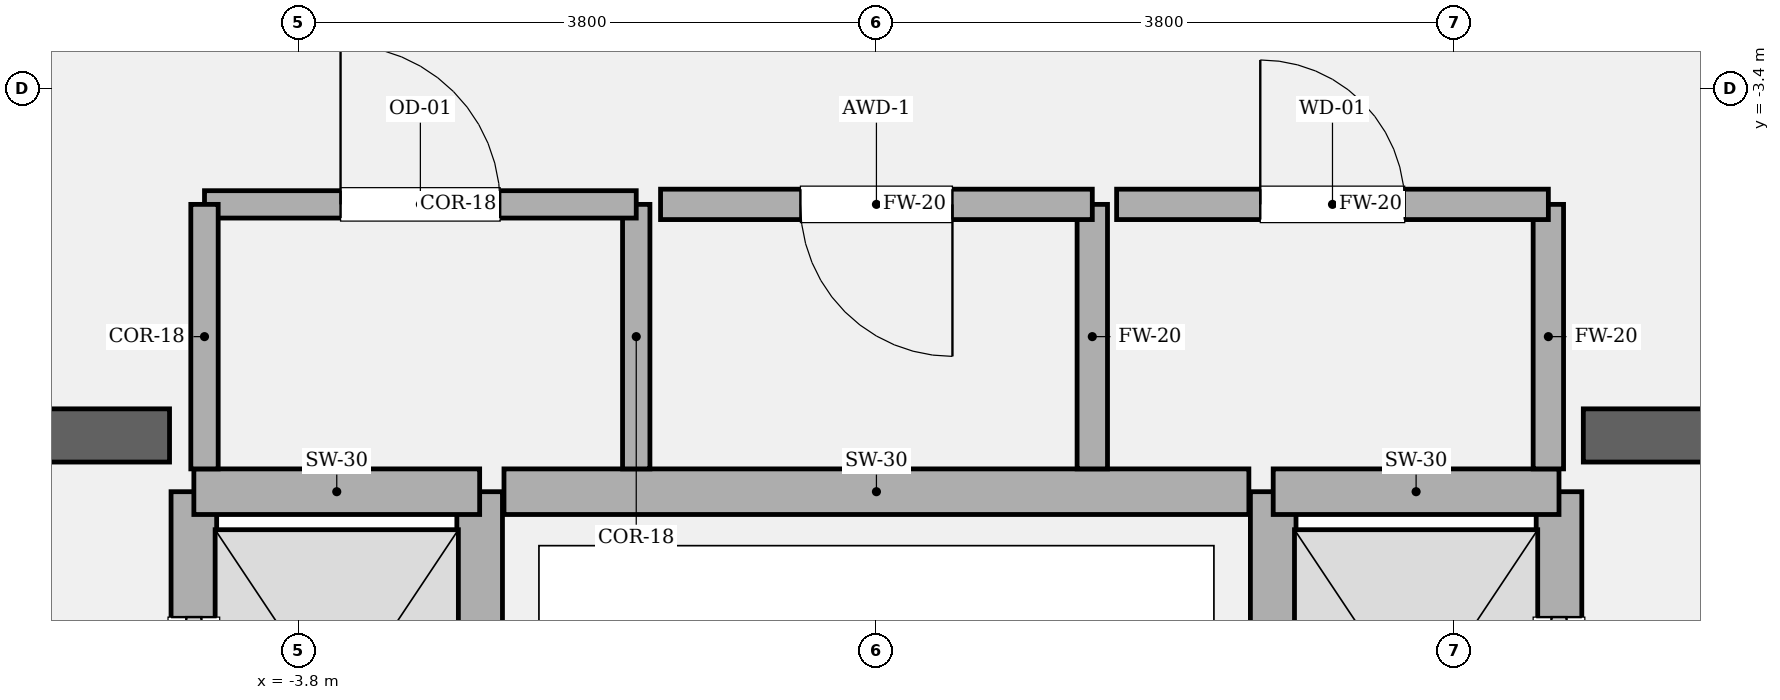
"""IFC4 building model, lengths in metres.
Left out: names, types, materials, properties, quantities, classifications, styles, units other than length and angle.
Written with IfcOpenShell. Run it as: python <this file> out.ifc"""

import sys

from ifc_helpers import new_model, si_unit, direction, frame, frame_2d, origin, place, context, subcontext, project, spatial, rectangle, extrude, element, fill, save


model = new_model("IFC4")
c1 = context("Model", 3, precision=1e-05, world=origin(), true_north=direction((0.0, 1.0)))
c2 = subcontext(c1, "Body", "Model", "MODEL_VIEW")
j1 = project(units=[si_unit("LENGTHUNIT", "METRE"), si_unit("PLANEANGLEUNIT", "RADIAN")], contexts=[c1])
p1 = place(None, origin())
s1 = spatial("IfcSite", under=j1, at=p1, CompositionType="ELEMENT")
p2 = place(p1, origin())
s2 = spatial("IfcBuilding", under=s1, at=p2, CompositionType="ELEMENT")
p3 = place(p2, frame((0.0, 0.0, 60.6)))
s3 = spatial("IfcBuildingStorey", under=s2, at=p3, CompositionType="ELEMENT", Elevation=60.6)
p4 = place(p3, frame((-9.825, -5.68, 0.0), z_axis=(0.0, 0.0, 1.0), x_axis=(1.0, 0.0, 0.0)))
e1 = element("IfcWall", 1, at=p4, inside=s3, PredefinedType="SOLIDWALL", context=c2, shape_type="SweptSolid", body=[
    extrude(rectangle(XDim=5.175, YDim=0.35, at=frame_2d((2.587, 0.0))), origin(), (0.0, 0.0, 1.0), 4.05),
])
p5 = place(p4, frame((1.285, 0.0, 0.0)))
e2 = element("IfcOpeningElement", 2, at=p5, cuts=e1, PredefinedType="OPENING", context=c2, shape_type="SweptSolid", body=[
    extrude(rectangle(XDim=1.18, YDim=2.2, at=frame_2d((0.59, 1.1))), frame((0.0, 0.185, 0.0), z_axis=(0.0, -1.0, 0.0), x_axis=(1.0, 0.0, 0.0)), (0.0, 0.0, 1.0), 0.37),
])
p6 = place(p3, frame((4.65, -5.68, 0.0), z_axis=(0.0, 0.0, 1.0), x_axis=(1.0, 0.0, 0.0)))
e3 = element("IfcWall", 3, at=p6, inside=s3, PredefinedType="SOLIDWALL", context=c2, shape_type="SweptSolid", body=[
    extrude(rectangle(XDim=5.175, YDim=0.35, at=frame_2d((2.587, 0.0))), origin(), (0.0, 0.0, 1.0), 4.05),
])
p7 = place(p6, frame((2.71, 0.0, 0.0)))
e4 = element("IfcOpeningElement", 4, at=p7, cuts=e3, PredefinedType="OPENING", context=c2, shape_type="SweptSolid", body=[
    extrude(rectangle(XDim=1.18, YDim=2.2, at=frame_2d((0.59, 1.1))), frame((0.0, 0.185, 0.0), z_axis=(0.0, -1.0, 0.0), x_axis=(1.0, 0.0, 0.0)), (0.0, 0.0, 1.0), 0.37),
])
p8 = place(p3, frame((-4.49, -8.82, 0.0), z_axis=(0.0, 0.0, 1.0), x_axis=(0.0, 1.0, 0.0)))
e5 = element("IfcWall", 5, at=p8, inside=s3, PredefinedType="SOLIDWALL", context=c2, shape_type="SweptSolid", body=[
    extrude(rectangle(XDim=2.77, YDim=0.3, at=frame_2d((1.385, 0.0))), origin(), (0.0, 0.0, 1.0), 3.81),
])
p9 = place(p8, frame((0.825, 0.0, 0.0)))
e6 = element("IfcOpeningElement", 6, at=p9, cuts=e5, PredefinedType="OPENING", context=c2, shape_type="SweptSolid", body=[
    extrude(rectangle(XDim=1.12, YDim=2.25, at=frame_2d((0.56, 1.125))), frame((0.0, 0.16, 0.0), z_axis=(0.0, -1.0, 0.0), x_axis=(1.0, 0.0, 0.0)), (0.0, 0.0, 1.0), 0.32),
])
p10 = place(p3, frame((-2.61, -8.82, 0.0), z_axis=(0.0, 0.0, 1.0), x_axis=(0.0, 1.0, 0.0)))
e7 = element("IfcWall", 7, at=p10, inside=s3, PredefinedType="SOLIDWALL", context=c2, shape_type="SweptSolid", body=[
    extrude(rectangle(XDim=2.77, YDim=0.3, at=frame_2d((1.385, 0.0))), origin(), (0.0, 0.0, 1.0), 3.81),
])
p11 = place(p3, frame((-4.49, -6.05, 0.0), z_axis=(0.0, 0.0, 1.0), x_axis=(1.0, 0.0, 0.0)))
e8 = element("IfcWall", 8, at=p11, inside=s3, PredefinedType="SOLIDWALL", context=c2, shape_type="SweptSolid", body=[
    extrude(rectangle(XDim=1.88, YDim=0.3, at=frame_2d((0.94, 0.0))), origin(), (0.0, 0.0, 1.0), 3.81),
])
p12 = place(p3, frame((4.49, -8.82, 0.0), z_axis=(0.0, 0.0, 1.0), x_axis=(0.0, 1.0, 0.0)))
e9 = element("IfcWall", 9, at=p12, inside=s3, PredefinedType="SOLIDWALL", context=c2, shape_type="SweptSolid", body=[
    extrude(rectangle(XDim=2.77, YDim=0.3, at=frame_2d((1.385, 0.0))), origin(), (0.0, 0.0, 1.0), 3.81),
])
p13 = place(p12, frame((0.825, 0.0, 0.0)))
e10 = element("IfcOpeningElement", 10, at=p13, cuts=e9, PredefinedType="OPENING", context=c2, shape_type="SweptSolid", body=[
    extrude(rectangle(XDim=1.12, YDim=2.25, at=frame_2d((0.56, 1.125))), frame((0.0, 0.16, 0.0), z_axis=(0.0, -1.0, 0.0), x_axis=(1.0, 0.0, 0.0)), (0.0, 0.0, 1.0), 0.32),
])
p14 = place(p3, frame((2.61, -8.82, 0.0), z_axis=(0.0, 0.0, 1.0), x_axis=(0.0, 1.0, 0.0)))
e11 = element("IfcWall", 11, at=p14, inside=s3, PredefinedType="SOLIDWALL", context=c2, shape_type="SweptSolid", body=[
    extrude(rectangle(XDim=2.77, YDim=0.3, at=frame_2d((1.385, 0.0))), origin(), (0.0, 0.0, 1.0), 3.81),
])
p15 = place(p3, frame((2.61, -6.05, 0.0), z_axis=(0.0, 0.0, 1.0), x_axis=(1.0, 0.0, 0.0)))
e12 = element("IfcWall", 12, at=p15, inside=s3, PredefinedType="SOLIDWALL", context=c2, shape_type="SweptSolid", body=[
    extrude(rectangle(XDim=1.88, YDim=0.3, at=frame_2d((0.94, 0.0))), origin(), (0.0, 0.0, 1.0), 3.81),
])
p16 = place(p3, frame((-2.45, -6.05, 0.0), z_axis=(0.0, 0.0, 1.0), x_axis=(1.0, 0.0, 0.0)))
e13 = element("IfcWall", 13, at=p16, inside=s3, PredefinedType="SOLIDWALL", context=c2, shape_type="SweptSolid", body=[
    extrude(rectangle(XDim=4.9, YDim=0.3, at=frame_2d((2.45, 0.0))), origin(), (0.0, 0.0, 1.0), 3.81),
])
p17 = place(p3, frame((-1.58, -5.9, 0.0), z_axis=(0.0, 0.0, 1.0), x_axis=(0.0, 1.0, 0.0)))
e14 = element("IfcWall", 14, at=p17, inside=s3, PredefinedType="PARTITIONING", context=c2, shape_type="SweptSolid", body=[
    extrude(rectangle(XDim=1.74, YDim=0.18, at=frame_2d((0.87, 0.0))), origin(), (0.0, 0.0, 1.0), 3.81),
])
p18 = place(p3, frame((-1.58, -4.16, 0.0), z_axis=(0.0, 0.0, 1.0), x_axis=(-1.0, 0.0, 0.0)))
e15 = element("IfcWall", 15, at=p18, inside=s3, PredefinedType="PARTITIONING", context=c2, shape_type="SweptSolid", body=[
    extrude(rectangle(XDim=2.84, YDim=0.18, at=frame_2d((1.42, 0.0))), origin(), (0.0, 0.0, 1.0), 3.81),
])
p19 = place(p18, frame((0.895, 0.0, 0.0)))
e16 = element("IfcOpeningElement", 16, at=p19, cuts=e15, PredefinedType="OPENING", context=c2, shape_type="SweptSolid", body=[
    extrude(rectangle(XDim=1.05, YDim=2.2, at=frame_2d((0.525, 1.1))), frame((0.0, 0.1, 0.0), z_axis=(0.0, -1.0, 0.0), x_axis=(1.0, 0.0, 0.0)), (0.0, 0.0, 1.0), 0.2),
])
p20 = place(p3, frame((-4.42, -4.16, 0.0), z_axis=(0.0, 0.0, 1.0), x_axis=(0.0, -1.0, 0.0)))
e17 = element("IfcWall", 17, at=p20, inside=s3, PredefinedType="PARTITIONING", context=c2, shape_type="SweptSolid", body=[
    extrude(rectangle(XDim=1.74, YDim=0.18, at=frame_2d((0.87, 0.0))), origin(), (0.0, 0.0, 1.0), 3.81),
])
p21 = place(p3, frame((1.42, -5.9, 0.0), z_axis=(0.0, 0.0, 1.0), x_axis=(0.0, 1.0, 0.0)))
e18 = element("IfcWall", 18, at=p21, inside=s3, PredefinedType="SOLIDWALL", context=c2, shape_type="SweptSolid", body=[
    extrude(rectangle(XDim=1.74, YDim=0.2, at=frame_2d((0.87, 0.0))), origin(), (0.0, 0.0, 1.0), 3.81),
])
p22 = place(p3, frame((1.42, -4.16, 0.0), z_axis=(0.0, 0.0, 1.0), x_axis=(-1.0, 0.0, 0.0)))
e19 = element("IfcWall", 19, at=p22, inside=s3, PredefinedType="SOLIDWALL", context=c2, shape_type="SweptSolid", body=[
    extrude(rectangle(XDim=2.84, YDim=0.2, at=frame_2d((1.42, 0.0))), origin(), (0.0, 0.0, 1.0), 3.81),
])
p23 = place(p22, frame((0.92, 0.0, 0.0)))
e20 = element("IfcOpeningElement", 20, at=p23, cuts=e19, PredefinedType="OPENING", context=c2, shape_type="SweptSolid", body=[
    extrude(rectangle(XDim=1.0, YDim=2.15, at=frame_2d((0.5, 1.075))), frame((0.0, 0.11, 0.0), z_axis=(0.0, -1.0, 0.0), x_axis=(1.0, 0.0, 0.0)), (0.0, 0.0, 1.0), 0.22),
])
p24 = place(p3, frame((4.42, -5.9, 0.0), z_axis=(0.0, 0.0, 1.0), x_axis=(0.0, 1.0, 0.0)))
e21 = element("IfcWall", 21, at=p24, inside=s3, PredefinedType="SOLIDWALL", context=c2, shape_type="SweptSolid", body=[
    extrude(rectangle(XDim=1.74, YDim=0.2, at=frame_2d((0.87, 0.0))), origin(), (0.0, 0.0, 1.0), 3.81),
])
p25 = place(p3, frame((4.42, -4.16, 0.0), z_axis=(0.0, 0.0, 1.0), x_axis=(-1.0, 0.0, 0.0)))
e22 = element("IfcWall", 22, at=p25, inside=s3, PredefinedType="SOLIDWALL", context=c2, shape_type="SweptSolid", body=[
    extrude(rectangle(XDim=2.84, YDim=0.2, at=frame_2d((1.42, 0.0))), origin(), (0.0, 0.0, 1.0), 3.81),
])
p26 = place(p25, frame((0.945, 0.0, 0.0)))
e23 = element("IfcOpeningElement", 23, at=p26, cuts=e22, PredefinedType="OPENING", context=c2, shape_type="SweptSolid", body=[
    extrude(rectangle(XDim=0.95, YDim=2.15, at=frame_2d((0.475, 1.075))), frame((0.0, 0.11, 0.0), z_axis=(0.0, -1.0, 0.0), x_axis=(1.0, 0.0, 0.0)), (0.0, 0.0, 1.0), 0.22),
])
p27 = place(p9, origin())
e24 = element("IfcDoor", 24, at=p27, inside=s3, OperationType="SLIDING_TO_LEFT", PredefinedType="DOOR", context=c2, shape_type="SweptSolid", body=[
    extrude(rectangle(XDim=1.12, YDim=2.25, at=frame_2d((0.56, 1.125))), frame((0.0, 0.025, 0.0), z_axis=(0.0, -1.0, 0.0), x_axis=(1.0, 0.0, 0.0)), (0.0, 0.0, 1.0), 0.05),
])
fill(e6, e24)
p28 = place(p13, origin())
e25 = element("IfcDoor", 25, at=p28, inside=s3, OperationType="SLIDING_TO_RIGHT", PredefinedType="DOOR", context=c2, shape_type="SweptSolid", body=[
    extrude(rectangle(XDim=1.12, YDim=2.25, at=frame_2d((0.56, 1.125))), frame((0.0, 0.025, 0.0), z_axis=(0.0, -1.0, 0.0), x_axis=(1.0, 0.0, 0.0)), (0.0, 0.0, 1.0), 0.05),
])
fill(e10, e25)
p29 = place(p19, origin())
e26 = element("IfcDoor", 26, at=p29, inside=s3, OperationType="SINGLE_SWING_RIGHT", PredefinedType="DOOR", context=c2, shape_type="SweptSolid", body=[
    extrude(rectangle(XDim=1.05, YDim=2.2, at=frame_2d((0.525, 1.1))), frame((0.0, 0.025, 0.0), z_axis=(0.0, -1.0, 0.0), x_axis=(1.0, 0.0, 0.0)), (0.0, 0.0, 1.0), 0.05),
])
fill(e16, e26)
p30 = place(p23, origin())
e27 = element("IfcDoor", 27, at=p30, inside=s3, OperationType="SINGLE_SWING_LEFT", PredefinedType="DOOR", context=c2, shape_type="SweptSolid", body=[
    extrude(rectangle(XDim=1.0, YDim=2.15, at=frame_2d((0.5, 1.075))), frame((0.0, 0.025, 0.0), z_axis=(0.0, -1.0, 0.0), x_axis=(1.0, 0.0, 0.0)), (0.0, 0.0, 1.0), 0.05),
])
fill(e20, e27)
p31 = place(p26, origin())
e28 = element("IfcDoor", 28, at=p31, inside=s3, OperationType="SINGLE_SWING_RIGHT", PredefinedType="DOOR", context=c2, shape_type="SweptSolid", body=[
    extrude(rectangle(XDim=0.95, YDim=2.15, at=frame_2d((0.475, 1.075))), frame((0.0, 0.025, 0.0), z_axis=(0.0, -1.0, 0.0), x_axis=(1.0, 0.0, 0.0)), (0.0, 0.0, 1.0), 0.05),
])
fill(e23, e28)
save(model, sys.argv[1])
